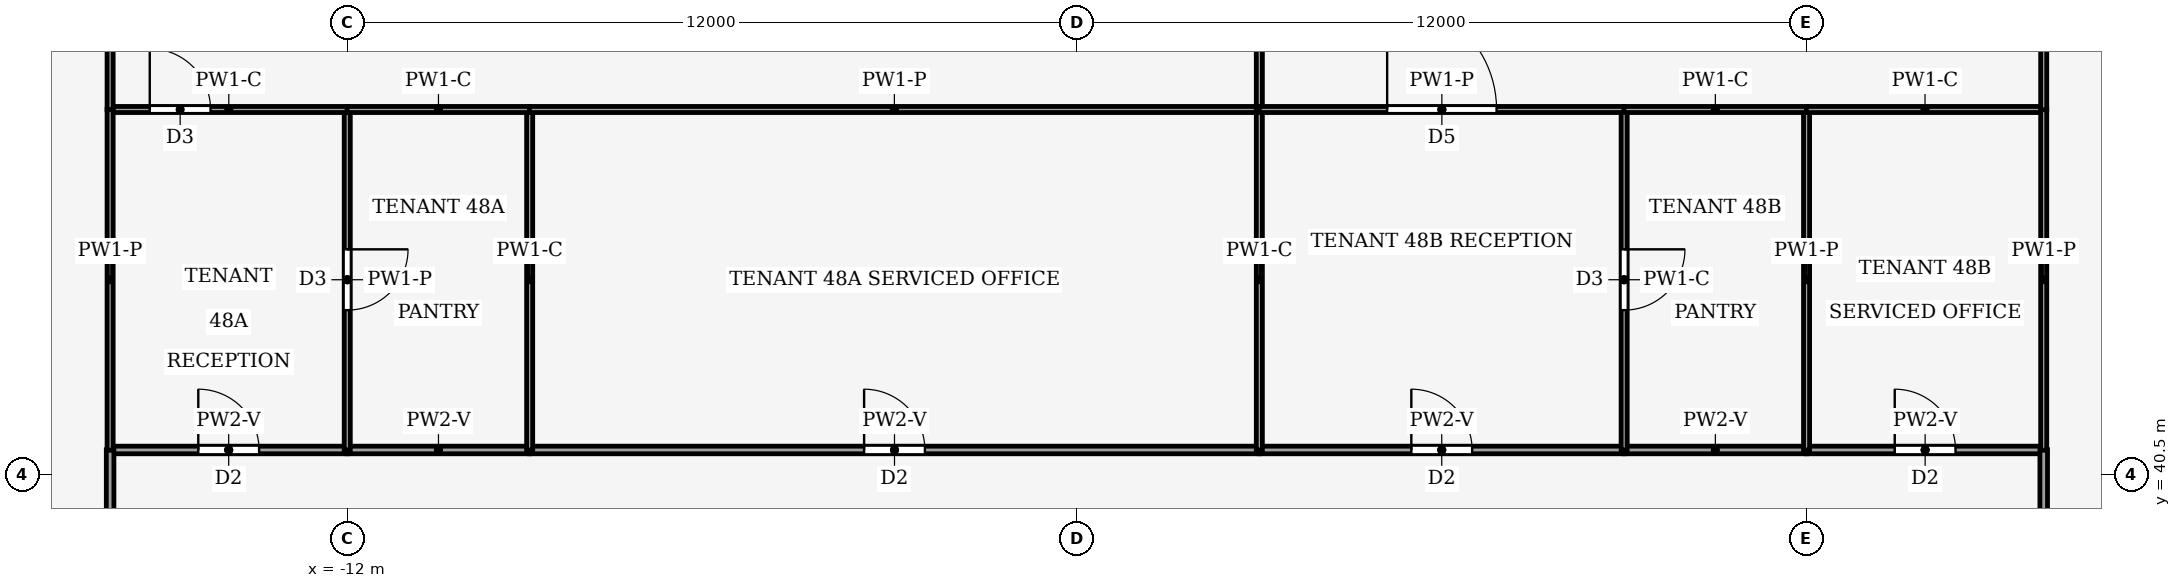
"""IFC4 building model, lengths in metres.
Left out: names, types, materials, properties, quantities, classifications, styles, units other than length and angle.
Written with IfcOpenShell. Run it as: python <this file> out.ifc"""

import sys

from ifc_helpers import new_model, si_unit, direction, frame, frame_2d, origin, place, context, subcontext, project, spatial, rectangle, extrude, element, fill, save


model = new_model("IFC4")
c1 = context("Model", 3, precision=1e-05, world=origin(), true_north=direction((0.0, 1.0)))
c2 = subcontext(c1, "Body", "Model", "MODEL_VIEW")
j1 = project(units=[si_unit("LENGTHUNIT", "METRE"), si_unit("PLANEANGLEUNIT", "RADIAN")], contexts=[c1])
p1 = place(None, origin())
s1 = spatial("IfcSite", under=j1, at=p1, CompositionType="ELEMENT")
p2 = place(p1, origin())
s2 = spatial("IfcBuilding", under=s1, at=p2, CompositionType="ELEMENT")
p3 = place(p2, frame((0.0, 0.0, 210.0)))
s3 = spatial("IfcBuildingStorey", under=s2, at=p3, CompositionType="ELEMENT", Elevation=210.0)
p4 = place(p3, frame((-15.9, 40.9, 0.0), z_axis=(0.0, 0.0, 1.0), x_axis=(1.0, 0.0, 0.0)))
e1 = element("IfcWall", 1, at=p4, inside=s3, PredefinedType="PARTITIONING", context=c2, shape_type="SweptSolid", body=[
    extrude(rectangle(XDim=3.9, YDim=0.125, at=frame_2d((1.95, 0.0))), origin(), (0.0, 0.0, 1.0), 3.44),
])
p5 = place(p4, frame((1.45, 0.0, 0.0)))
e2 = element("IfcOpeningElement", 2, at=p5, cuts=e1, PredefinedType="OPENING", context=c2, shape_type="SweptSolid", body=[
    extrude(rectangle(XDim=1.0, YDim=2.1, at=frame_2d((0.5, 1.05))), frame((0.0, 0.073, 0.0), z_axis=(0.0, -1.0, 0.0), x_axis=(1.0, 0.0, 0.0)), (0.0, 0.0, 1.0), 0.145),
])
p6 = place(p3, frame((-9.0, 40.9, 0.0), z_axis=(0.0, 0.0, 1.0), x_axis=(-1.0, 0.0, 0.0)))
e3 = element("IfcWall", 3, at=p6, inside=s3, PredefinedType="PARTITIONING", context=c2, shape_type="SweptSolid", body=[
    extrude(rectangle(XDim=3.0, YDim=0.125, at=frame_2d((1.5, 0.0))), origin(), (0.0, 0.0, 1.0), 3.44),
])
p7 = place(p3, frame((-9.0, 40.9, 0.0), z_axis=(0.0, 0.0, 1.0), x_axis=(1.0, 0.0, 0.0)))
e4 = element("IfcWall", 4, at=p7, inside=s3, PredefinedType="PARTITIONING", context=c2, shape_type="SweptSolid", body=[
    extrude(rectangle(XDim=12.0, YDim=0.125, at=frame_2d((6.0, 0.0))), origin(), (0.0, 0.0, 1.0), 3.44),
])
p8 = place(p7, frame((5.5, 0.0, 0.0)))
e5 = element("IfcOpeningElement", 5, at=p8, cuts=e4, PredefinedType="OPENING", context=c2, shape_type="SweptSolid", body=[
    extrude(rectangle(XDim=1.0, YDim=2.1, at=frame_2d((0.5, 1.05))), frame((0.0, 0.073, 0.0), z_axis=(0.0, -1.0, 0.0), x_axis=(1.0, 0.0, 0.0)), (0.0, 0.0, 1.0), 0.145),
])
p9 = place(p3, frame((3.0, 40.9, 0.0), z_axis=(0.0, 0.0, 1.0), x_axis=(1.0, 0.0, 0.0)))
e6 = element("IfcWall", 6, at=p9, inside=s3, PredefinedType="PARTITIONING", context=c2, shape_type="SweptSolid", body=[
    extrude(rectangle(XDim=6.0, YDim=0.125, at=frame_2d((3.0, 0.0))), origin(), (0.0, 0.0, 1.0), 3.44),
])
p10 = place(p9, frame((2.5, 0.0, 0.0)))
e7 = element("IfcOpeningElement", 7, at=p10, cuts=e6, PredefinedType="OPENING", context=c2, shape_type="SweptSolid", body=[
    extrude(rectangle(XDim=1.0, YDim=2.1, at=frame_2d((0.5, 1.05))), frame((0.0, 0.073, 0.0), z_axis=(0.0, -1.0, 0.0), x_axis=(1.0, 0.0, 0.0)), (0.0, 0.0, 1.0), 0.145),
])
p11 = place(p3, frame((12.0, 40.9, 0.0), z_axis=(0.0, 0.0, 1.0), x_axis=(-1.0, 0.0, 0.0)))
e8 = element("IfcWall", 8, at=p11, inside=s3, PredefinedType="PARTITIONING", context=c2, shape_type="SweptSolid", body=[
    extrude(rectangle(XDim=3.0, YDim=0.125, at=frame_2d((1.5, 0.0))), origin(), (0.0, 0.0, 1.0), 3.44),
])
p12 = place(p3, frame((12.0, 40.9, 0.0), z_axis=(0.0, 0.0, 1.0), x_axis=(1.0, 0.0, 0.0)))
e9 = element("IfcWall", 9, at=p12, inside=s3, PredefinedType="PARTITIONING", context=c2, shape_type="SweptSolid", body=[
    extrude(rectangle(XDim=3.9, YDim=0.125, at=frame_2d((1.95, 0.0))), origin(), (0.0, 0.0, 1.0), 3.44),
])
p13 = place(p12, frame((1.45, 0.0, 0.0)))
e10 = element("IfcOpeningElement", 10, at=p13, cuts=e9, PredefinedType="OPENING", context=c2, shape_type="SweptSolid", body=[
    extrude(rectangle(XDim=1.0, YDim=2.1, at=frame_2d((0.5, 1.05))), frame((0.0, 0.073, 0.0), z_axis=(0.0, -1.0, 0.0), x_axis=(1.0, 0.0, 0.0)), (0.0, 0.0, 1.0), 0.145),
])
p14 = place(p3, frame((-15.9, 31.5, 0.0), z_axis=(0.0, 0.0, 1.0), x_axis=(0.0, 1.0, 0.0)))
e11 = element("IfcWall", 11, at=p14, inside=s3, PredefinedType="PARTITIONING", context=c2, shape_type="SweptSolid", body=[
    extrude(rectangle(XDim=9.404, YDim=0.125, at=frame_2d((4.702, 0.0))), origin(), (0.0, 0.0, 1.0), 3.14),
])
p15 = place(p14, frame((4.202, 0.0, 0.0)))
e12 = element("IfcOpeningElement", 12, at=p15, cuts=e11, PredefinedType="OPENING", context=c2, shape_type="SweptSolid", body=[
    extrude(rectangle(XDim=1.0, YDim=2.1, at=frame_2d((0.5, 1.05))), frame((0.0, 0.073, 0.0), z_axis=(0.0, -1.0, 0.0), x_axis=(1.0, 0.0, 0.0)), (0.0, 0.0, 1.0), 0.145),
])
p16 = place(p3, frame((15.9, 40.904, 0.0), z_axis=(0.0, 0.0, 1.0), x_axis=(0.0, -1.0, 0.0)))
e13 = element("IfcWall", 13, at=p16, inside=s3, PredefinedType="PARTITIONING", context=c2, shape_type="SweptSolid", body=[
    extrude(rectangle(XDim=3.404, YDim=0.125, at=frame_2d((1.702, 0.0))), origin(), (0.0, 0.0, 1.0), 3.14),
])
p17 = place(p16, frame((1.602, 0.0, 0.0)))
e14 = element("IfcOpeningElement", 14, at=p17, cuts=e13, PredefinedType="OPENING", context=c2, shape_type="SweptSolid", body=[
    extrude(rectangle(XDim=1.0, YDim=2.1, at=frame_2d((0.5, 1.05))), frame((0.0, 0.073, 0.0), z_axis=(0.0, -1.0, 0.0), x_axis=(1.0, 0.0, 0.0)), (0.0, 0.0, 1.0), 0.145),
])
p18 = place(p3, frame((-12.0, 46.5, 0.0), z_axis=(0.0, 0.0, 1.0), x_axis=(0.0, -1.0, 0.0)))
e15 = element("IfcWall", 15, at=p18, inside=s3, PredefinedType="PARTITIONING", context=c2, shape_type="SweptSolid", body=[
    extrude(rectangle(XDim=5.6, YDim=0.1, at=frame_2d((2.8, 0.0))), origin(), (0.0, 0.0, 1.0), 3.44),
])
p19 = place(p18, frame((2.3, 0.0, 0.0)))
e16 = element("IfcOpeningElement", 16, at=p19, cuts=e15, PredefinedType="OPENING", context=c2, shape_type="SweptSolid", body=[
    extrude(rectangle(XDim=1.0, YDim=2.1, at=frame_2d((0.5, 1.05))), frame((0.0, 0.06, 0.0), z_axis=(0.0, -1.0, 0.0), x_axis=(1.0, 0.0, 0.0)), (0.0, 0.0, 1.0), 0.12),
])
p20 = place(p3, frame((-15.9, 46.5, 0.0), z_axis=(0.0, 0.0, 1.0), x_axis=(1.0, 0.0, 0.0)))
e17 = element("IfcWall", 17, at=p20, inside=s3, PredefinedType="PARTITIONING", context=c2, shape_type="SweptSolid", body=[
    extrude(rectangle(XDim=3.904, YDim=0.1, at=frame_2d((1.952, 0.0))), origin(), (0.0, 0.0, 1.0), 3.87),
])
p21 = place(p20, frame((0.652, 0.0, 0.0)))
e18 = element("IfcOpeningElement", 18, at=p21, cuts=e17, PredefinedType="OPENING", context=c2, shape_type="SweptSolid", body=[
    extrude(rectangle(XDim=1.0, YDim=2.1, at=frame_2d((0.5, 1.05))), frame((0.0, 0.06, 0.0), z_axis=(0.0, -1.0, 0.0), x_axis=(1.0, 0.0, 0.0)), (0.0, 0.0, 1.0), 0.12),
])
p22 = place(p3, frame((-15.9, 46.504, 0.0), z_axis=(0.0, 0.0, 1.0), x_axis=(0.0, -1.0, 0.0)))
e19 = element("IfcWall", 19, at=p22, inside=s3, PredefinedType="PARTITIONING", context=c2, shape_type="SweptSolid", body=[
    extrude(rectangle(XDim=5.608, YDim=0.1, at=frame_2d((2.804, 0.0))), origin(), (0.0, 0.0, 1.0), 3.44),
])
p23 = place(p3, frame((-9.0, 40.9, 0.0), z_axis=(0.0, 0.0, 1.0), x_axis=(0.0, 1.0, 0.0)))
e20 = element("IfcWall", 20, at=p23, inside=s3, PredefinedType="PARTITIONING", context=c2, shape_type="SweptSolid", body=[
    extrude(rectangle(XDim=5.6, YDim=0.1, at=frame_2d((2.8, 0.0))), origin(), (0.0, 0.0, 1.0), 3.87),
])
p24 = place(p3, frame((-8.996, 46.5, 0.0), z_axis=(0.0, 0.0, 1.0), x_axis=(-1.0, 0.0, 0.0)))
e21 = element("IfcWall", 21, at=p24, inside=s3, PredefinedType="PARTITIONING", context=c2, shape_type="SweptSolid", body=[
    extrude(rectangle(XDim=3.008, YDim=0.1, at=frame_2d((1.504, 0.0))), origin(), (0.0, 0.0, 1.0), 3.87),
])
p25 = place(p3, frame((3.0, 46.5, 0.0), z_axis=(0.0, 0.0, 1.0), x_axis=(-1.0, 0.0, 0.0)))
e22 = element("IfcWall", 22, at=p25, inside=s3, PredefinedType="PARTITIONING", context=c2, shape_type="SweptSolid", body=[
    extrude(rectangle(XDim=12.004, YDim=0.1, at=frame_2d((6.002, 0.0))), origin(), (0.0, 0.0, 1.0), 3.44),
])
p26 = place(p3, frame((3.0, 40.9, 0.0), z_axis=(0.0, 0.0, 1.0), x_axis=(0.0, 1.0, 0.0)))
e23 = element("IfcWall", 23, at=p26, inside=s3, PredefinedType="PARTITIONING", context=c2, shape_type="SweptSolid", body=[
    extrude(rectangle(XDim=5.6, YDim=0.1, at=frame_2d((2.8, 0.0))), origin(), (0.0, 0.0, 1.0), 3.87),
])
p27 = place(p3, frame((3.0, 46.5, 0.0), z_axis=(0.0, 0.0, 1.0), x_axis=(0.0, 1.0, 0.0)))
e24 = element("IfcWall", 24, at=p27, inside=s3, PredefinedType="PARTITIONING", context=c2, shape_type="SweptSolid", body=[
    extrude(rectangle(XDim=15.004, YDim=0.1, at=frame_2d((7.502, 0.0))), origin(), (0.0, 0.0, 1.0), 3.24),
])
p28 = place(p3, frame((-15.9, 61.504, 0.0), z_axis=(0.0, 0.0, 1.0), x_axis=(0.0, -1.0, 0.0)))
e25 = element("IfcWall", 25, at=p28, inside=s3, PredefinedType="PARTITIONING", context=c2, shape_type="SweptSolid", body=[
    extrude(rectangle(XDim=15.008, YDim=0.1, at=frame_2d((7.504, 0.0))), origin(), (0.0, 0.0, 1.0), 3.24),
])
p29 = place(p3, frame((9.0, 46.5, 0.0), z_axis=(0.0, 0.0, 1.0), x_axis=(0.0, -1.0, 0.0)))
e26 = element("IfcWall", 26, at=p29, inside=s3, PredefinedType="PARTITIONING", context=c2, shape_type="SweptSolid", body=[
    extrude(rectangle(XDim=5.6, YDim=0.1, at=frame_2d((2.8, 0.0))), origin(), (0.0, 0.0, 1.0), 3.87),
])
p30 = place(p29, frame((2.3, 0.0, 0.0)))
e27 = element("IfcOpeningElement", 27, at=p30, cuts=e26, PredefinedType="OPENING", context=c2, shape_type="SweptSolid", body=[
    extrude(rectangle(XDim=1.0, YDim=2.1, at=frame_2d((0.5, 1.05))), frame((0.0, 0.06, 0.0), z_axis=(0.0, -1.0, 0.0), x_axis=(1.0, 0.0, 0.0)), (0.0, 0.0, 1.0), 0.12),
])
p31 = place(p3, frame((3.0, 46.5, 0.0), z_axis=(0.0, 0.0, 1.0), x_axis=(1.0, 0.0, 0.0)))
e28 = element("IfcWall", 28, at=p31, inside=s3, PredefinedType="PARTITIONING", context=c2, shape_type="SweptSolid", body=[
    extrude(rectangle(XDim=6.004, YDim=0.1, at=frame_2d((3.002, 0.0))), origin(), (0.0, 0.0, 1.0), 3.44),
])
p32 = place(p31, frame((2.102, 0.0, 0.0)))
e29 = element("IfcOpeningElement", 29, at=p32, cuts=e28, PredefinedType="OPENING", context=c2, shape_type="SweptSolid", body=[
    extrude(rectangle(XDim=1.8, YDim=2.1, at=frame_2d((0.9, 1.05))), frame((0.0, 0.06, 0.0), z_axis=(0.0, -1.0, 0.0), x_axis=(1.0, 0.0, 0.0)), (0.0, 0.0, 1.0), 0.12),
])
p33 = place(p3, frame((12.0, 40.9, 0.0), z_axis=(0.0, 0.0, 1.0), x_axis=(0.0, 1.0, 0.0)))
e30 = element("IfcWall", 30, at=p33, inside=s3, PredefinedType="PARTITIONING", context=c2, shape_type="SweptSolid", body=[
    extrude(rectangle(XDim=5.6, YDim=0.1, at=frame_2d((2.8, 0.0))), origin(), (0.0, 0.0, 1.0), 3.44),
])
p34 = place(p3, frame((12.004, 46.5, 0.0), z_axis=(0.0, 0.0, 1.0), x_axis=(-1.0, 0.0, 0.0)))
e31 = element("IfcWall", 31, at=p34, inside=s3, PredefinedType="PARTITIONING", context=c2, shape_type="SweptSolid", body=[
    extrude(rectangle(XDim=3.008, YDim=0.1, at=frame_2d((1.504, 0.0))), origin(), (0.0, 0.0, 1.0), 3.87),
])
p35 = place(p3, frame((15.9, 46.5, 0.0), z_axis=(0.0, 0.0, 1.0), x_axis=(-1.0, 0.0, 0.0)))
e32 = element("IfcWall", 32, at=p35, inside=s3, PredefinedType="PARTITIONING", context=c2, shape_type="SweptSolid", body=[
    extrude(rectangle(XDim=3.904, YDim=0.1, at=frame_2d((1.952, 0.0))), origin(), (0.0, 0.0, 1.0), 3.87),
])
p36 = place(p3, frame((15.9, 40.896, 0.0), z_axis=(0.0, 0.0, 1.0), x_axis=(0.0, 1.0, 0.0)))
e33 = element("IfcWall", 33, at=p36, inside=s3, PredefinedType="PARTITIONING", context=c2, shape_type="SweptSolid", body=[
    extrude(rectangle(XDim=5.608, YDim=0.1, at=frame_2d((2.804, 0.0))), origin(), (0.0, 0.0, 1.0), 3.44),
])
p37 = place(p3, frame((15.9, 46.496, 0.0), z_axis=(0.0, 0.0, 1.0), x_axis=(0.0, 1.0, 0.0)))
e34 = element("IfcWall", 34, at=p37, inside=s3, PredefinedType="PARTITIONING", context=c2, shape_type="SweptSolid", body=[
    extrude(rectangle(XDim=18.008, YDim=0.1, at=frame_2d((9.004, 0.0))), origin(), (0.0, 0.0, 1.0), 3.24),
])
p38 = place(p5, origin())
e35 = element("IfcDoor", 35, at=p38, inside=s3, OperationType="SINGLE_SWING_LEFT", PredefinedType="DOOR", context=c2, shape_type="SweptSolid", body=[
    extrude(rectangle(XDim=1.0, YDim=2.1, at=frame_2d((0.5, 1.05))), frame((0.0, 0.025, 0.0), z_axis=(0.0, -1.0, 0.0), x_axis=(1.0, 0.0, 0.0)), (0.0, 0.0, 1.0), 0.05),
])
fill(e2, e35)
p39 = place(p8, origin())
e36 = element("IfcDoor", 36, at=p39, inside=s3, OperationType="SINGLE_SWING_RIGHT", PredefinedType="DOOR", context=c2, shape_type="SweptSolid", body=[
    extrude(rectangle(XDim=1.0, YDim=2.1, at=frame_2d((0.5, 1.05))), frame((0.0, 0.025, 0.0), z_axis=(0.0, -1.0, 0.0), x_axis=(1.0, 0.0, 0.0)), (0.0, 0.0, 1.0), 0.05),
])
fill(e5, e36)
p40 = place(p10, origin())
e37 = element("IfcDoor", 37, at=p40, inside=s3, OperationType="SINGLE_SWING_LEFT", PredefinedType="DOOR", context=c2, shape_type="SweptSolid", body=[
    extrude(rectangle(XDim=1.0, YDim=2.1, at=frame_2d((0.5, 1.05))), frame((0.0, 0.025, 0.0), z_axis=(0.0, -1.0, 0.0), x_axis=(1.0, 0.0, 0.0)), (0.0, 0.0, 1.0), 0.05),
])
fill(e7, e37)
p41 = place(p13, origin())
e38 = element("IfcDoor", 38, at=p41, inside=s3, OperationType="SINGLE_SWING_RIGHT", PredefinedType="DOOR", context=c2, shape_type="SweptSolid", body=[
    extrude(rectangle(XDim=1.0, YDim=2.1, at=frame_2d((0.5, 1.05))), frame((0.0, 0.025, 0.0), z_axis=(0.0, -1.0, 0.0), x_axis=(1.0, 0.0, 0.0)), (0.0, 0.0, 1.0), 0.05),
])
fill(e10, e38)
p42 = place(p19, origin())
e39 = element("IfcDoor", 39, at=p42, inside=s3, OperationType="SINGLE_SWING_RIGHT", PredefinedType="DOOR", context=c2, shape_type="SweptSolid", body=[
    extrude(rectangle(XDim=1.0, YDim=2.1, at=frame_2d((0.5, 1.05))), frame((0.0, 0.025, 0.0), z_axis=(0.0, -1.0, 0.0), x_axis=(1.0, 0.0, 0.0)), (0.0, 0.0, 1.0), 0.05),
])
fill(e16, e39)
p43 = place(p21, origin())
e40 = element("IfcDoor", 40, at=p43, inside=s3, OperationType="SINGLE_SWING_LEFT", PredefinedType="DOOR", context=c2, shape_type="SweptSolid", body=[
    extrude(rectangle(XDim=1.0, YDim=2.1, at=frame_2d((0.5, 1.05))), frame((0.0, 0.025, 0.0), z_axis=(0.0, -1.0, 0.0), x_axis=(1.0, 0.0, 0.0)), (0.0, 0.0, 1.0), 0.05),
])
fill(e18, e40)
p44 = place(p30, origin())
e41 = element("IfcDoor", 41, at=p44, inside=s3, OperationType="SINGLE_SWING_RIGHT", PredefinedType="DOOR", context=c2, shape_type="SweptSolid", body=[
    extrude(rectangle(XDim=1.0, YDim=2.1, at=frame_2d((0.5, 1.05))), frame((0.0, 0.025, 0.0), z_axis=(0.0, -1.0, 0.0), x_axis=(1.0, 0.0, 0.0)), (0.0, 0.0, 1.0), 0.05),
])
fill(e27, e41)
p45 = place(p32, origin())
e42 = element("IfcDoor", 42, at=p45, inside=s3, OperationType="DOUBLE_DOOR_SINGLE_SWING", PredefinedType="DOOR", context=c2, shape_type="SweptSolid", body=[
    extrude(rectangle(XDim=1.8, YDim=2.1, at=frame_2d((0.9, 1.05))), frame((0.0, 0.025, 0.0), z_axis=(0.0, -1.0, 0.0), x_axis=(1.0, 0.0, 0.0)), (0.0, 0.0, 1.0), 0.05),
])
fill(e29, e42)
save(model, sys.argv[1])
